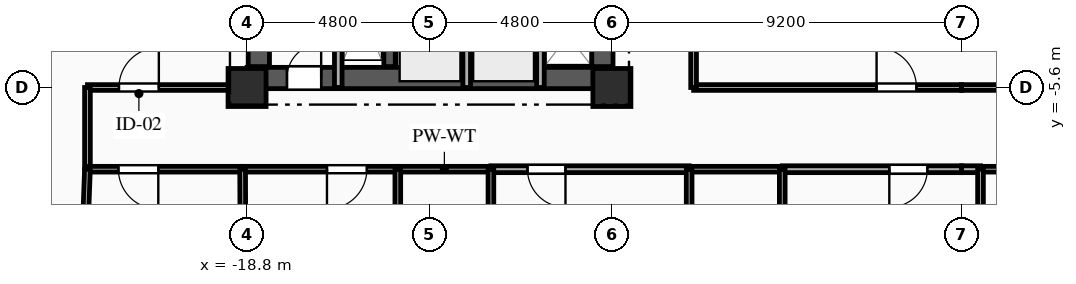
"""IFC4 building model, lengths in metres.
Left out: names, types, materials, properties, quantities, classifications, styles, units other than length and angle.
Written with IfcOpenShell. Run it as: python <this file> out.ifc"""

import sys

from ifc_helpers import new_model, si_unit, direction, frame, frame_2d, origin, origin_2d, place, context, subcontext, project, spatial, rectangle, extrude, element, fill, save


model = new_model("IFC4")
c1 = context("Model", 3, precision=1e-05, world=origin(), true_north=direction((0.0, 1.0)))
c2 = subcontext(c1, "Body", "Model", "MODEL_VIEW")
j1 = project(units=[si_unit("LENGTHUNIT", "METRE"), si_unit("PLANEANGLEUNIT", "RADIAN")], contexts=[c1])
p1 = place(None, origin())
s1 = spatial("IfcSite", under=j1, at=p1, CompositionType="ELEMENT")
p2 = place(p1, origin())
s2 = spatial("IfcBuilding", under=s1, at=p2, CompositionType="ELEMENT")
p3 = place(p2, frame((0.0, 0.0, 92.4)))
s3 = spatial("IfcBuildingStorey", under=s2, at=p3, CompositionType="ELEMENT", Elevation=92.4)
for number, where, z_axis, x_axis in (
    (1, (-18.8, -5.6, 0.0), (0.0, 0.0, 1.0), (1.0, 0.0, 0.0)),
    (2, (-9.2, -5.6, 0.0), (0.0, 0.0, 1.0), (1.0, 0.0, 0.0)),
):
    element("IfcColumn", number, at=place(p3, frame(where, z_axis=z_axis, x_axis=x_axis)), inside=s3, PredefinedType="COLUMN", context=c2, shape_type="SweptSolid", body=[
        extrude(rectangle(XDim=1.0, YDim=1.0, at=origin_2d()), origin(), (0.0, 0.0, 1.0), 3.35),
    ])
p4 = place(p3, frame((-18.8, -5.35, 0.0), z_axis=(0.0, 0.0, 1.0), x_axis=(1.0, 0.0, 0.0)))
e3 = element("IfcWall", 3, at=p4, inside=s3, PredefinedType="SHEAR", context=c2, shape_type="SweptSolid", body=[
    extrude(rectangle(XDim=9.6, YDim=0.56, at=frame_2d((4.8, 0.0))), origin(), (0.0, 0.0, 1.0), 3.045),
])
p5 = place(p4, frame((1.05, 0.0, 0.0)))
e4 = element("IfcOpeningElement", 4, at=p5, cuts=e3, PredefinedType="OPENING", context=c2, shape_type="SweptSolid", body=[
    extrude(rectangle(XDim=0.9, YDim=2.1, at=frame_2d((0.45, 1.05))), frame((0.0, 0.29, 0.0), z_axis=(0.0, -1.0, 0.0), x_axis=(1.0, 0.0, 0.0)), (0.0, 0.0, 1.0), 0.58),
])
p6 = place(p3, frame((-18.49, -5.05, 0.0), z_axis=(0.0, 0.0, 1.0), x_axis=(0.0, 1.0, 0.0)))
e5 = element("IfcWall", 5, at=p6, inside=s3, PredefinedType="SHEAR", context=c2, shape_type="SweptSolid", body=[
    extrude(rectangle(XDim=10.1, YDim=0.56, at=frame_2d((5.05, 0.0))), origin(), (0.0, 0.0, 1.0), 3.045),
])
p7 = place(p3, frame((-9.45, -5.05, 0.0), z_axis=(0.0, 0.0, 1.0), x_axis=(0.0, 1.0, 0.0)))
e6 = element("IfcWall", 6, at=p7, inside=s3, PredefinedType="SHEAR", context=c2, shape_type="SweptSolid", body=[
    extrude(rectangle(XDim=10.1, YDim=0.56, at=frame_2d((5.05, 0.0))), origin(), (0.0, 0.0, 1.0), 3.045),
])
p8 = place(p7, frame((7.15, 0.0, 0.0)))
e7 = element("IfcOpeningElement", 7, at=p8, cuts=e6, PredefinedType="OPENING", context=c2, shape_type="SweptSolid", body=[
    extrude(rectangle(XDim=0.9, YDim=2.1, at=frame_2d((0.45, 1.05))), frame((0.0, 0.29, 0.0), z_axis=(0.0, -1.0, 0.0), x_axis=(1.0, 0.0, 0.0)), (0.0, 0.0, 1.0), 0.58),
])
p9 = place(p7, frame((2.4, 0.0, 0.0)))
e8 = element("IfcOpeningElement", 8, at=p9, cuts=e6, PredefinedType="OPENING", context=c2, shape_type="SweptSolid", body=[
    extrude(rectangle(XDim=1.2, YDim=2.15, at=frame_2d((0.6, 1.075))), frame((0.0, 0.29, 0.0), z_axis=(0.0, -1.0, 0.0), x_axis=(1.0, 0.0, 0.0)), (0.0, 0.0, 1.0), 0.58),
])
p10 = place(p3, frame((-15.05, -5.05, 0.0), z_axis=(0.0, 0.0, 1.0), x_axis=(0.0, 1.0, 0.0)))
e9 = element("IfcWall", 9, at=p10, inside=s3, PredefinedType="SHEAR", context=c2, shape_type="SweptSolid", body=[
    extrude(rectangle(XDim=10.1, YDim=0.3, at=frame_2d((5.05, 0.0))), origin(), (0.0, 0.0, 1.0), 3.045),
])
p11 = place(p3, frame((-16.4, -5.6, 0.0), z_axis=(0.0, 0.0, 1.0), x_axis=(0.0, 1.0, 0.0)))
e10 = element("IfcWall", 10, at=p11, inside=s3, PredefinedType="PARTITIONING", context=c2, shape_type="SweptSolid", body=[
    extrude(rectangle(XDim=3.49, YDim=0.2, at=frame_2d((1.745, 0.0))), origin(), (0.0, 0.0, 1.0), 3.045),
])
for number, where, z_axis, x_axis in (
    (11, (-13.02, -5.6, 0.0), (0.0, 0.0, 1.0), (0.0, 1.0, 0.0)),
    (12, (-11.08, -5.6, 0.0), (0.0, 0.0, 1.0), (0.0, 1.0, 0.0)),
):
    element("IfcWall", number, at=place(p3, frame(where, z_axis=z_axis, x_axis=x_axis)), inside=s3, PredefinedType="PARTITIONING", context=c2, shape_type="SweptSolid", body=[
        extrude(rectangle(XDim=2.25, YDim=0.2, at=frame_2d((1.125, 0.0))), origin(), (0.0, 0.0, 1.0), 3.045),
    ])
p12 = place(p3, frame((-23.0, -5.6, 0.0), z_axis=(0.0, 0.0, 1.0), x_axis=(1.0, 0.0, 0.0)))
e13 = element("IfcWall", 13, at=p12, inside=s3, PredefinedType="PARTITIONING", context=c2, shape_type="SweptSolid", body=[
    extrude(rectangle(XDim=4.2, YDim=0.15, at=frame_2d((2.1, 0.0))), origin(), (0.0, 0.0, 1.0), 3.045),
])
p13 = place(p12, frame((0.829, 0.0, 0.0)))
e14 = element("IfcOpeningElement", 14, at=p13, cuts=e13, PredefinedType="OPENING", context=c2, shape_type="SweptSolid", body=[
    extrude(rectangle(XDim=1.05, YDim=2.15, at=frame_2d((0.525, 1.075))), frame((0.0, 0.085, 0.0), z_axis=(0.0, -1.0, 0.0), x_axis=(1.0, 0.0, 0.0)), (0.0, 0.0, 1.0), 0.17),
])
p14 = place(p3, frame((-23.0, -7.75, 0.0), z_axis=(0.0, 0.0, 1.0), x_axis=(0.0, 1.0, 0.0)))
e15 = element("IfcWall", 15, at=p14, inside=s3, PredefinedType="PARTITIONING", context=c2, shape_type="SweptSolid", body=[
    extrude(rectangle(XDim=2.15, YDim=0.15, at=frame_2d((1.075, 0.0))), origin(), (0.0, 0.0, 1.0), 2.7),
])
p15 = place(p3, frame((-18.917, -7.75, 0.0), z_axis=(0.0, 0.0, 1.0), x_axis=(-1.0, 0.0, 0.0)))
e16 = element("IfcWall", 16, at=p15, inside=s3, PredefinedType="PARTITIONING", context=c2, shape_type="SweptSolid", body=[
    extrude(rectangle(XDim=4.083, YDim=0.15, at=frame_2d((2.042, 0.0))), origin(), (0.0, 0.0, 1.0), 3.045),
])
p16 = place(p15, frame((2.219, 0.0, 0.0)))
e17 = element("IfcOpeningElement", 17, at=p16, cuts=e16, PredefinedType="OPENING", context=c2, shape_type="SweptSolid", body=[
    extrude(rectangle(XDim=1.05, YDim=2.15, at=frame_2d((0.525, 1.075))), frame((0.0, 0.085, 0.0), z_axis=(0.0, -1.0, 0.0), x_axis=(1.0, 0.0, 0.0)), (0.0, 0.0, 1.0), 0.17),
])
p17 = place(p3, frame((-14.833, -7.75, 0.0), z_axis=(0.0, 0.0, 1.0), x_axis=(-1.0, 0.0, 0.0)))
e18 = element("IfcWall", 18, at=p17, inside=s3, PredefinedType="PARTITIONING", context=c2, shape_type="SweptSolid", body=[
    extrude(rectangle(XDim=4.083, YDim=0.15, at=frame_2d((2.042, 0.0))), origin(), (0.0, 0.0, 1.0), 3.045),
])
p18 = place(p17, frame((0.814, 0.0, 0.0)))
e19 = element("IfcOpeningElement", 19, at=p18, cuts=e18, PredefinedType="OPENING", context=c2, shape_type="SweptSolid", body=[
    extrude(rectangle(XDim=1.05, YDim=2.15, at=frame_2d((0.525, 1.075))), frame((0.0, 0.085, 0.0), z_axis=(0.0, -1.0, 0.0), x_axis=(1.0, 0.0, 0.0)), (0.0, 0.0, 1.0), 0.17),
])
p19 = place(p3, frame((-7.167, -7.75, 0.0), z_axis=(0.0, 0.0, 1.0), x_axis=(-1.0, 0.0, 0.0)))
e20 = element("IfcWall", 20, at=p19, inside=s3, PredefinedType="PARTITIONING", context=c2, shape_type="SweptSolid", body=[
    extrude(rectangle(XDim=5.216, YDim=0.18, at=frame_2d((2.608, 0.0))), origin(), (0.0, 0.0, 1.0), 3.045),
])
p20 = place(p19, frame((3.254, 0.0, 0.0)))
e21 = element("IfcOpeningElement", 21, at=p20, cuts=e20, PredefinedType="OPENING", context=c2, shape_type="SweptSolid", body=[
    extrude(rectangle(XDim=1.0, YDim=2.15, at=frame_2d((0.5, 1.075))), frame((0.0, 0.1, 0.0), z_axis=(0.0, -1.0, 0.0), x_axis=(1.0, 0.0, 0.0)), (0.0, 0.0, 1.0), 0.2),
])
p21 = place(p3, frame((-12.383, -7.75, 0.0), z_axis=(0.0, 0.0, 1.0), x_axis=(-1.0, 0.0, 0.0)))
e22 = element("IfcWall", 22, at=p21, inside=s3, PredefinedType="PLUMBINGWALL", context=c2, shape_type="SweptSolid", body=[
    extrude(rectangle(XDim=2.45, YDim=0.15, at=frame_2d((1.225, 0.0))), origin(), (0.0, 0.0, 1.0), 3.045),
])
p22 = place(p3, frame((0.0, -7.75, 0.0), z_axis=(0.0, 0.0, 1.0), x_axis=(-1.0, 0.0, 0.0)))
e23 = element("IfcWall", 23, at=p22, inside=s3, PredefinedType="PARTITIONING", context=c2, shape_type="SweptSolid", body=[
    extrude(rectangle(XDim=4.717, YDim=0.18, at=frame_2d((2.358, 0.0))), origin(), (0.0, 0.0, 1.0), 3.045),
])
p23 = place(p22, frame((0.9, 0.0, 0.0)))
e24 = element("IfcOpeningElement", 24, at=p23, cuts=e23, PredefinedType="OPENING", context=c2, shape_type="SweptSolid", body=[
    extrude(rectangle(XDim=1.0, YDim=2.15, at=frame_2d((0.5, 1.075))), frame((0.0, 0.1, 0.0), z_axis=(0.0, -1.0, 0.0), x_axis=(1.0, 0.0, 0.0)), (0.0, 0.0, 1.0), 0.2),
])
p24 = place(p3, frame((-4.717, -7.75, 0.0), z_axis=(0.0, 0.0, 1.0), x_axis=(-1.0, 0.0, 0.0)))
e25 = element("IfcWall", 25, at=p24, inside=s3, PredefinedType="PLUMBINGWALL", context=c2, shape_type="SweptSolid", body=[
    extrude(rectangle(XDim=2.45, YDim=0.15, at=frame_2d((1.225, 0.0))), origin(), (0.0, 0.0, 1.0), 3.045),
])
p25 = place(p3, frame((-7.05, -5.6, 0.0), z_axis=(0.0, 0.0, 1.0), x_axis=(1.0, 0.0, 0.0)))
e26 = element("IfcWall", 26, at=p25, inside=s3, PredefinedType="PARTITIONING", context=c2, shape_type="SweptSolid", body=[
    extrude(rectangle(XDim=7.05, YDim=0.15, at=frame_2d((3.525, 0.0))), origin(), (0.0, 0.0, 1.0), 2.53),
])
p26 = place(p25, frame((4.815, 0.0, 0.0)))
e27 = element("IfcOpeningElement", 27, at=p26, cuts=e26, PredefinedType="OPENING", context=c2, shape_type="SweptSolid", body=[
    extrude(rectangle(XDim=1.05, YDim=2.15, at=frame_2d((0.525, 1.075))), frame((0.0, 0.085, 0.0), z_axis=(0.0, -1.0, 0.0), x_axis=(1.0, 0.0, 0.0)), (0.0, 0.0, 1.0), 0.17),
])
p27 = place(p3, frame((0.5, -7.75, 0.0), z_axis=(0.0, 0.0, 1.0), x_axis=(-1.0, 0.0, 0.0)))
e28 = element("IfcWall", 28, at=p27, inside=s3, PredefinedType="PARTITIONING", context=c2, shape_type="SweptSolid", body=[
    extrude(rectangle(XDim=0.5, YDim=0.18, at=frame_2d((0.25, 0.0))), origin(), (0.0, 0.0, 1.0), 3.045),
])
p28 = place(p3, frame((2.95, -7.75, 0.0), z_axis=(0.0, 0.0, 1.0), x_axis=(-1.0, 0.0, 0.0)))
e29 = element("IfcWall", 29, at=p28, inside=s3, PredefinedType="PLUMBINGWALL", context=c2, shape_type="SweptSolid", body=[
    extrude(rectangle(XDim=2.45, YDim=0.15, at=frame_2d((1.225, 0.0))), origin(), (0.0, 0.0, 1.0), 3.045),
])
p29 = place(p3, frame((0.0, -5.6, 0.0), z_axis=(0.0, 0.0, 1.0), x_axis=(1.0, 0.0, 0.0)))
e30 = element("IfcWall", 30, at=p29, inside=s3, PredefinedType="PARTITIONING", context=c2, shape_type="SweptSolid", body=[
    extrude(rectangle(XDim=7.05, YDim=0.15, at=frame_2d((3.525, 0.0))), origin(), (0.0, 0.0, 1.0), 2.53),
])
p30 = place(p3, frame((-7.05, 1.45, 0.0), z_axis=(0.0, 0.0, 1.0), x_axis=(0.0, -1.0, 0.0)))
e31 = element("IfcWall", 31, at=p30, inside=s3, PredefinedType="PARTITIONING", context=c2, shape_type="SweptSolid", body=[
    extrude(rectangle(XDim=7.05, YDim=0.15, at=frame_2d((3.525, 0.0))), origin(), (0.0, 0.0, 1.0), 3.045),
])
p31 = place(p3, frame((-23.0, -7.75, 0.0), z_axis=(0.0, 0.0, 1.0), x_axis=(-0.036924695214, -0.999318050914, 0.0)))
e32 = element("IfcWall", 32, at=p31, inside=s3, PredefinedType="PARTITIONING", context=c2, shape_type="SweptSolid", body=[
    extrude(rectangle(XDim=10.176, YDim=0.15, at=frame_2d((5.088, 0.0))), origin(), (0.0, 0.0, 1.0), 3.045),
])
p32 = place(p3, frame((-18.917, -7.75, 0.0), z_axis=(0.0, 0.0, 1.0), x_axis=(0.003853205971, -0.999992576374, 0.0)))
e33 = element("IfcWall", 33, at=p32, inside=s3, PredefinedType="PARTITIONING", context=c2, shape_type="SweptSolid", body=[
    extrude(rectangle(XDim=11.405, YDim=0.15, at=frame_2d((5.702, 0.0))), origin(), (0.0, 0.0, 1.0), 3.045),
])
for number, where, z_axis, x_axis in (
    (34, (-14.833, -7.75, 0.0), (0.0, 0.0, 1.0), (0.0, -1.0, 0.0)),
    (35, (-12.383, -9.9, 0.0), (0.0, 0.0, 1.0), (0.0, 1.0, 0.0)),
    (36, (-7.167, -7.75, 0.0), (0.0, 0.0, 1.0), (0.0, -1.0, 0.0)),
    (37, (-4.717, -9.9, 0.0), (0.0, 0.0, 1.0), (0.0, 1.0, 0.0)),
    (38, (0.5, -7.75, 0.0), (0.0, 0.0, 1.0), (0.0, -1.0, 0.0)),
):
    element("IfcWall", number, at=place(p3, frame(where, z_axis=z_axis, x_axis=x_axis)), inside=s3, PredefinedType="PLUMBINGWALL", context=c2, shape_type="SweptSolid", body=[
        extrude(rectangle(XDim=2.15, YDim=0.15, at=frame_2d((1.075, 0.0))), origin(), (0.0, 0.0, 1.0), 3.045),
    ])
p33 = place(p5, origin())
e39 = element("IfcDoor", 39, at=p33, inside=s3, OperationType="SINGLE_SWING_RIGHT", PredefinedType="DOOR", context=c2, shape_type="SweptSolid", body=[
    extrude(rectangle(XDim=0.9, YDim=2.1, at=frame_2d((0.45, 1.05))), frame((0.0, 0.025, 0.0), z_axis=(0.0, -1.0, 0.0), x_axis=(1.0, 0.0, 0.0)), (0.0, 0.0, 1.0), 0.05),
])
fill(e4, e39)
p34 = place(p13, origin())
e40 = element("IfcDoor", 40, at=p34, inside=s3, OperationType="SINGLE_SWING_RIGHT", PredefinedType="DOOR", context=c2, shape_type="SweptSolid", body=[
    extrude(rectangle(XDim=1.05, YDim=2.15, at=frame_2d((0.525, 1.075))), frame((0.0, 0.025, 0.0), z_axis=(0.0, -1.0, 0.0), x_axis=(1.0, 0.0, 0.0)), (0.0, 0.0, 1.0), 0.05),
])
fill(e14, e40)
p35 = place(p16, origin())
e41 = element("IfcDoor", 41, at=p35, inside=s3, OperationType="SINGLE_SWING_LEFT", PredefinedType="DOOR", context=c2, shape_type="SweptSolid", body=[
    extrude(rectangle(XDim=1.05, YDim=2.15, at=frame_2d((0.525, 1.075))), frame((0.0, 0.025, 0.0), z_axis=(0.0, -1.0, 0.0), x_axis=(1.0, 0.0, 0.0)), (0.0, 0.0, 1.0), 0.05),
])
fill(e17, e41)
p36 = place(p18, origin())
e42 = element("IfcDoor", 42, at=p36, inside=s3, OperationType="SINGLE_SWING_RIGHT", PredefinedType="DOOR", context=c2, shape_type="SweptSolid", body=[
    extrude(rectangle(XDim=1.05, YDim=2.15, at=frame_2d((0.525, 1.075))), frame((0.0, 0.025, 0.0), z_axis=(0.0, -1.0, 0.0), x_axis=(1.0, 0.0, 0.0)), (0.0, 0.0, 1.0), 0.05),
])
fill(e19, e42)
p37 = place(p20, origin())
e43 = element("IfcDoor", 43, at=p37, inside=s3, OperationType="SINGLE_SWING_LEFT", PredefinedType="DOOR", context=c2, shape_type="SweptSolid", body=[
    extrude(rectangle(XDim=1.0, YDim=2.15, at=frame_2d((0.5, 1.075))), frame((0.0, 0.025, 0.0), z_axis=(0.0, -1.0, 0.0), x_axis=(1.0, 0.0, 0.0)), (0.0, 0.0, 1.0), 0.05),
])
fill(e21, e43)
p38 = place(p23, origin())
e44 = element("IfcDoor", 44, at=p38, inside=s3, OperationType="SINGLE_SWING_RIGHT", PredefinedType="DOOR", context=c2, shape_type="SweptSolid", body=[
    extrude(rectangle(XDim=1.0, YDim=2.15, at=frame_2d((0.5, 1.075))), frame((0.0, 0.025, 0.0), z_axis=(0.0, -1.0, 0.0), x_axis=(1.0, 0.0, 0.0)), (0.0, 0.0, 1.0), 0.05),
])
fill(e24, e44)
p39 = place(p26, origin())
e45 = element("IfcDoor", 45, at=p39, inside=s3, OperationType="SINGLE_SWING_LEFT", PredefinedType="DOOR", context=c2, shape_type="SweptSolid", body=[
    extrude(rectangle(XDim=1.05, YDim=2.15, at=frame_2d((0.525, 1.075))), frame((0.0, 0.025, 0.0), z_axis=(0.0, -1.0, 0.0), x_axis=(1.0, 0.0, 0.0)), (0.0, 0.0, 1.0), 0.05),
])
fill(e27, e45)
save(model, sys.argv[1])
